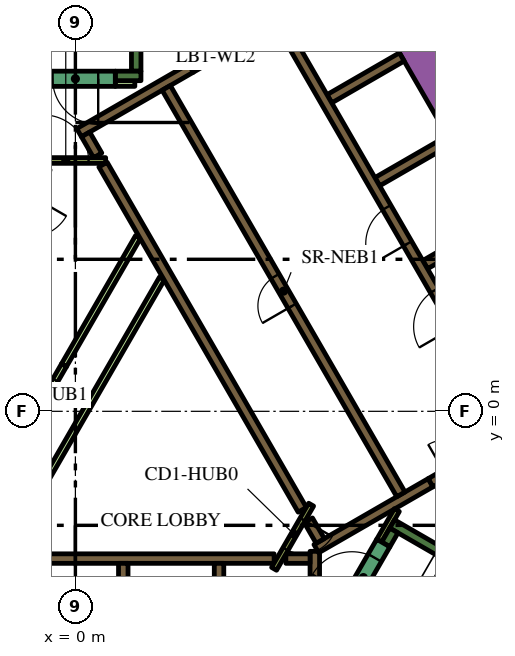
"""IFC4 building model, lengths in metres.
Left out: names, types, materials, properties, quantities, classifications, styles, units other than length and angle.
Written with IfcOpenShell. Run it as: python <this file> out.ifc"""

import sys

from ifc_helpers import new_model, si_unit, direction, frame, frame_2d, origin, place, context, subcontext, project, spatial, rectangle, extrude, element, fill, save


model = new_model("IFC4")
c1 = context("Model", 3, precision=1e-05, world=origin(), true_north=direction((0.0, 1.0)))
c2 = subcontext(c1, "Body", "Model", "MODEL_VIEW")
j1 = project(units=[si_unit("LENGTHUNIT", "METRE"), si_unit("PLANEANGLEUNIT", "RADIAN")], contexts=[c1])
p1 = place(None, origin())
s1 = spatial("IfcSite", under=j1, at=p1, CompositionType="ELEMENT")
p2 = place(p1, origin())
s2 = spatial("IfcBuilding", under=s1, at=p2, CompositionType="ELEMENT")
p3 = place(p2, frame((0.0, 0.0, 66.6)))
s3 = spatial("IfcBuildingStorey", under=s2, at=p3, CompositionType="ELEMENT", Elevation=66.6)
p4 = place(p3, frame((6.461, 13.909, 0.0), z_axis=(0.0, 0.0, 1.0), x_axis=(0.500005804227, -0.866022052686, 0.0)))
e1 = element("IfcWall", 1, at=p4, inside=s3, PredefinedType="SOLIDWALL", context=c2, shape_type="SweptSolid", body=[
    extrude(rectangle(XDim=20.834, YDim=0.9, at=frame_2d((10.417, 0.0))), origin(), (0.0, 0.0, 1.0), 3.9),
])
p5 = place(p3, frame((8.334, -2.964, 0.0), z_axis=(0.0, 0.0, 1.0), x_axis=(0.866016039709, -0.500016218704, 0.0)))
e2 = element("IfcWall", 2, at=p5, inside=s3, PredefinedType="SOLIDWALL", context=c2, shape_type="SweptSolid", body=[
    extrude(rectangle(XDim=7.05, YDim=0.25, at=frame_2d((3.525, 0.0))), origin(), (0.0, 0.0, 1.0), 3.9),
])
p6 = place(p3, frame((8.168, -3.503, 0.0), z_axis=(0.0, 0.0, 1.0), x_axis=(0.49972245349, 0.866185586049, 0.0)))
e3 = element("IfcWall", 3, at=p6, inside=s3, PredefinedType="SOLIDWALL", context=c2, shape_type="SweptSolid", body=[
    extrude(rectangle(XDim=0.425, YDim=0.25, at=frame_2d((0.212, 0.0))), origin(), (0.0, 0.0, 1.0), 3.9),
])
p7 = place(p3, frame((1.6, 8.95, 0.0), z_axis=(0.0, 0.0, 1.0), x_axis=(0.0, 1.0, 0.0)))
e4 = element("IfcWall", 4, at=p7, inside=s3, PredefinedType="SOLIDWALL", context=c2, shape_type="SweptSolid", body=[
    extrude(rectangle(XDim=6.8, YDim=0.25, at=frame_2d((3.4, 0.0))), origin(), (0.0, 0.0, 1.0), 3.9),
])
p8 = place(p3, frame((1.05, 8.825, 0.0), z_axis=(0.0, 0.0, 1.0), x_axis=(1.0, 0.0, 0.0)))
e5 = element("IfcWall", 5, at=p8, inside=s3, PredefinedType="SOLIDWALL", context=c2, shape_type="SweptSolid", body=[
    extrude(rectangle(XDim=0.675, YDim=0.25, at=frame_2d((0.337, 0.0))), origin(), (0.0, 0.0, 1.0), 3.9),
])
p9 = place(p3, frame((-5.259, -3.875, 0.0), z_axis=(0.0, 0.0, 1.0), x_axis=(1.0, 0.0, 0.0)))
e6 = element("IfcWall", 6, at=p9, inside=s3, PredefinedType="SOLIDWALL", context=c2, shape_type="SweptSolid", body=[
    extrude(rectangle(XDim=10.489, YDim=0.25, at=frame_2d((5.244, 0.0))), origin(), (0.0, 0.0, 1.0), 3.9),
])
for number, where, z_axis, x_axis in (
    (7, (3.78, -4.0, 0.0), (0.0, 0.0, 1.0), (0.0, -1.0, 0.0)),
    (8, (1.26, -4.0, 0.0), (0.0, 0.0, 1.0), (0.0, -1.0, 0.0)),
):
    element("IfcWall", number, at=place(p3, frame(where, z_axis=z_axis, x_axis=x_axis)), inside=s3, PredefinedType="SOLIDWALL", context=c2, shape_type="SweptSolid", body=[
        extrude(rectangle(XDim=2.2, YDim=0.25, at=frame_2d((1.1, 0.0))), origin(), (0.0, 0.0, 1.0), 3.9),
    ])
p10 = place(p3, frame((6.3, -7.27, 0.0), z_axis=(0.0, 0.0, 1.0), x_axis=(0.0, 1.0, 0.0)))
e9 = element("IfcWall", 9, at=p10, inside=s3, PredefinedType="SOLIDWALL", context=c2, shape_type="SweptSolid", body=[
    extrude(rectangle(XDim=3.586, YDim=0.25, at=frame_2d((1.793, 0.0))), origin(), (0.0, 0.0, 1.0), 3.9),
])
p11 = place(p3, frame((5.538, -3.875, 0.0), z_axis=(0.0, 0.0, 1.0), x_axis=(1.0, 0.0, 0.0)))
e10 = element("IfcWall", 10, at=p11, inside=s3, PredefinedType="SOLIDWALL", context=c2, shape_type="SweptSolid", body=[
    extrude(rectangle(XDim=0.637, YDim=0.25, at=frame_2d((0.318, 0.0))), origin(), (0.0, 0.0, 1.0), 3.9),
])
p12 = place(p3, frame((9.346, -1.879, 0.0), z_axis=(0.0, 0.0, 1.0), x_axis=(-0.866048528039, -0.499959945477, 0.0)))
e11 = element("IfcWall", 11, at=p12, inside=s3, PredefinedType="SOLIDWALL", context=c2, shape_type="SweptSolid", body=[
    extrude(rectangle(XDim=3.47, YDim=0.25, at=frame_2d((1.735, 0.0))), origin(), (0.0, 0.0, 1.0), 3.9),
])
p13 = place(p3, frame((6.13, -2.867, 0.0), z_axis=(0.0, 0.0, 1.0), x_axis=(0.500160776593, -0.865932559475, 0.0)))
e12 = element("IfcWall", 12, at=p13, inside=s3, PredefinedType="SOLIDWALL", context=c2, shape_type="SweptSolid", body=[
    extrude(rectangle(XDim=0.627, YDim=0.25, at=frame_2d((0.313, 0.0))), origin(), (0.0, 0.0, 1.0), 3.9),
])
for number, where, z_axis, x_axis in (
    (13, (9.204, 3.859, 0.0), (0.0, 0.0, 1.0), (0.866, 0.5, 0.0)),
    (14, (7.944, 6.041, 0.0), (0.0, 0.0, 1.0), (0.866, 0.5, 0.0)),
    (15, (6.684, 8.224, 0.0), (0.0, 0.0, 1.0), (0.866, 0.5, 0.0)),
):
    element("IfcWall", number, at=place(p3, frame(where, z_axis=z_axis, x_axis=x_axis)), inside=s3, PredefinedType="SOLIDWALL", context=c2, shape_type="SweptSolid", body=[
        extrude(rectangle(XDim=2.2, YDim=0.25, at=frame_2d((1.1, 0.0))), origin(), (0.0, 0.0, 1.0), 3.9),
    ])
p14 = place(p3, frame((0.098, 7.331, 0.0), z_axis=(0.0, 0.0, 1.0), x_axis=(0.865988154826, 0.50006451154, 0.0)))
e16 = element("IfcWall", 16, at=p14, inside=s3, PredefinedType="SOLIDWALL", context=c2, shape_type="SweptSolid", body=[
    extrude(rectangle(XDim=3.398, YDim=0.25, at=frame_2d((1.699, 0.0))), origin(), (0.0, 0.0, 1.0), 3.9),
])
p15 = place(p3, frame((0.268, 7.285, 0.0), z_axis=(0.0, 0.0, 1.0), x_axis=(0.500098681536, -0.865968422476, 0.0)))
e17 = element("IfcWall", 17, at=p15, inside=s3, PredefinedType="SOLIDWALL", context=c2, shape_type="SweptSolid", body=[
    extrude(rectangle(XDim=0.636, YDim=0.25, at=frame_2d((0.318, 0.0))), origin(), (0.0, 0.0, 1.0), 3.9),
])
p16 = place(p3, frame((5.97, -2.591, 0.0), z_axis=(0.0, 0.0, 1.0), x_axis=(-0.499994469932, 0.866028596547, 0.0)))
e18 = element("IfcWall", 18, at=p16, inside=s3, PredefinedType="SOLIDWALL", context=c2, shape_type="SweptSolid", body=[
    extrude(rectangle(XDim=10.488, YDim=0.25, at=frame_2d((5.244, 0.0))), origin(), (0.0, 0.0, 1.0), 3.9),
])
p17 = place(p3, frame((8.459, -2.599, 0.0), z_axis=(0.0, 0.0, 1.0), x_axis=(-0.500041054325, -0.866001699761, 0.0)))
e19 = element("IfcWall", 19, at=p17, inside=s3, PredefinedType="PARTITIONING", context=c2, shape_type="SweptSolid", body=[
    extrude(rectangle(XDim=0.929, YDim=0.15, at=frame_2d((0.464, 0.0))), origin(), (0.0, 0.0, 1.0), 3.9),
])
p18 = place(p3, frame((-1.887, -3.718, 0.0), z_axis=(0.0, 0.0, 1.0), x_axis=(0.500005008002, 0.866022512394, 0.0)))
e20 = element("IfcWall", 20, at=p18, inside=s3, PredefinedType="PARTITIONING", context=c2, shape_type="SweptSolid", body=[
    extrude(rectangle(XDim=8.327, YDim=0.15, at=frame_2d((4.164, 0.0))), origin(), (0.0, 0.0, 1.0), 2.75),
])
p19 = place(p3, frame((-0.3, 1.212, 0.0), z_axis=(0.0, 0.0, 1.0), x_axis=(0.499963101113, 0.866046706318, 0.0)))
e21 = element("IfcWall", 21, at=p19, inside=s3, PredefinedType="PARTITIONING", context=c2, shape_type="SweptSolid", body=[
    extrude(rectangle(XDim=3.893, YDim=0.15, at=frame_2d((1.947, 0.0))), origin(), (0.0, 0.0, 1.0), 2.75),
])
p20 = place(p3, frame((1.05, 8.625, 0.0), z_axis=(0.0, 0.0, 1.0), x_axis=(1.0, 0.0, 0.0)))
e22 = element("IfcWall", 22, at=p20, inside=s3, PredefinedType="PARTITIONING", context=c2, shape_type="SweptSolid", body=[
    extrude(rectangle(XDim=0.514, YDim=0.15, at=frame_2d((0.257, 0.0))), origin(), (0.0, 0.0, 1.0), 2.75),
])
p21 = place(p3, frame((11.553, -0.46, 0.0), z_axis=(0.0, 0.0, 1.0), x_axis=(-0.500006514828, 0.866021642414, 0.0)))
e23 = element("IfcWall", 23, at=p21, inside=s3, PredefinedType="SOLIDWALL", context=c2, shape_type="SweptSolid", body=[
    extrude(rectangle(XDim=12.35, YDim=0.25, at=frame_2d((6.175, 0.0))), origin(), (0.0, 0.0, 1.0), 3.9),
])
p22 = place(p21, frame((0.585, 0.0, 0.0)))
e24 = element("IfcOpeningElement", 24, at=p22, cuts=e23, PredefinedType="OPENING", context=c2, shape_type="SweptSolid", body=[
    extrude(rectangle(XDim=1.1, YDim=2.1, at=frame_2d((0.55, 1.05))), frame((0.0, 0.135, 0.0), z_axis=(0.0, -1.0, 0.0), x_axis=(1.0, 0.0, 0.0)), (0.0, 0.0, 1.0), 0.27),
])
p23 = place(p21, frame((3.105, 0.0, 0.0)))
e25 = element("IfcOpeningElement", 25, at=p23, cuts=e23, PredefinedType="OPENING", context=c2, shape_type="SweptSolid", body=[
    extrude(rectangle(XDim=1.1, YDim=2.1, at=frame_2d((0.55, 1.05))), frame((0.0, 0.135, 0.0), z_axis=(0.0, -1.0, 0.0), x_axis=(1.0, 0.0, 0.0)), (0.0, 0.0, 1.0), 0.27),
])
p24 = place(p21, frame((5.625, 0.0, 0.0)))
e26 = element("IfcOpeningElement", 26, at=p24, cuts=e23, PredefinedType="OPENING", context=c2, shape_type="SweptSolid", body=[
    extrude(rectangle(XDim=1.1, YDim=2.1, at=frame_2d((0.55, 1.05))), frame((0.0, 0.135, 0.0), z_axis=(0.0, -1.0, 0.0), x_axis=(1.0, 0.0, 0.0)), (0.0, 0.0, 1.0), 0.27),
])
p25 = place(p3, frame((8.565, -2.185, 0.0), z_axis=(0.0, 0.0, 1.0), x_axis=(-0.499997954832, 0.866026584559, 0.0)))
e27 = element("IfcWall", 27, at=p25, inside=s3, PredefinedType="SOLIDWALL", context=c2, shape_type="SweptSolid", body=[
    extrude(rectangle(XDim=12.35, YDim=0.25, at=frame_2d((6.175, 0.0))), origin(), (0.0, 0.0, 1.0), 3.9),
])
p26 = place(p25, frame((5.725, 0.0, 0.0)))
e28 = element("IfcOpeningElement", 28, at=p26, cuts=e27, PredefinedType="OPENING", context=c2, shape_type="SweptSolid", body=[
    extrude(rectangle(XDim=0.9, YDim=2.1, at=frame_2d((0.45, 1.05))), frame((0.0, 0.135, 0.0), z_axis=(0.0, -1.0, 0.0), x_axis=(1.0, 0.0, 0.0)), (0.0, 0.0, 1.0), 0.27),
])
p27 = place(p3, frame((7.053, -5.284, 0.0), z_axis=(0.0, 0.0, 1.0), x_axis=(0.500078061341, 0.865980330357, 0.0)))
e29 = element("IfcWall", 29, at=p27, inside=s3, PredefinedType="SOLIDWALL", context=c2, shape_type="SweptSolid", body=[
    extrude(rectangle(XDim=2.1, YDim=0.4, at=frame_2d((1.05, 0.0))), origin(), (0.0, 0.0, 1.0), 3.9),
])
p28 = place(p27, frame((0.45, 0.0, 0.0)))
e30 = element("IfcOpeningElement", 30, at=p28, cuts=e29, PredefinedType="OPENING", context=c2, shape_type="SweptSolid", body=[
    extrude(rectangle(XDim=1.2, YDim=2.1, at=frame_2d((0.6, 1.05))), frame((0.0, 0.21, 0.0), z_axis=(0.0, -1.0, 0.0), x_axis=(1.0, 0.0, 0.0)), (0.0, 0.0, 1.0), 0.42),
])
p29 = place(p3, frame((9.346, -1.879, 0.0), z_axis=(0.0, 0.0, 1.0), x_axis=(0.866047807691, 0.499961193289, 0.0)))
e31 = element("IfcWall", 31, at=p29, inside=s3, PredefinedType="SOLIDWALL", context=c2, shape_type="SweptSolid", body=[
    extrude(rectangle(XDim=1.8, YDim=0.25, at=frame_2d((0.9, 0.0))), origin(), (0.0, 0.0, 1.0), 3.9),
])
p30 = place(p29, frame((0.45, 0.0, 0.0)))
e32 = element("IfcOpeningElement", 32, at=p30, cuts=e31, PredefinedType="OPENING", context=c2, shape_type="SweptSolid", body=[
    extrude(rectangle(XDim=0.9, YDim=2.1, at=frame_2d((0.45, 1.05))), frame((0.0, 0.135, 0.0), z_axis=(0.0, -1.0, 0.0), x_axis=(1.0, 0.0, 0.0)), (0.0, 0.0, 1.0), 0.27),
])
p31 = place(p3, frame((1.05, 8.75, 0.0), z_axis=(0.0, 0.0, 1.0), x_axis=(-1.0, 0.0, 0.0)))
e33 = element("IfcWall", 33, at=p31, inside=s3, PredefinedType="SOLIDWALL", context=c2, shape_type="SweptSolid", body=[
    extrude(rectangle(XDim=2.1, YDim=0.4, at=frame_2d((1.05, 0.0))), origin(), (0.0, 0.0, 1.0), 3.9),
])
p32 = place(p31, frame((0.45, 0.0, 0.0)))
e34 = element("IfcOpeningElement", 34, at=p32, cuts=e33, PredefinedType="OPENING", context=c2, shape_type="SweptSolid", body=[
    extrude(rectangle(XDim=1.2, YDim=2.1, at=frame_2d((0.6, 1.05))), frame((0.0, 0.21, 0.0), z_axis=(0.0, -1.0, 0.0), x_axis=(1.0, 0.0, 0.0)), (0.0, 0.0, 1.0), 0.42),
])
p33 = place(p3, frame((6.203, -2.456, 0.0), z_axis=(0.0, 0.0, 1.0), x_axis=(-0.500043961785, -0.866000020948, 0.0)))
e35 = element("IfcWall", 35, at=p33, inside=s3, PredefinedType="PARTITIONING", context=c2, shape_type="SweptSolid", body=[
    extrude(rectangle(XDim=1.95, YDim=0.15, at=frame_2d((0.975, 0.0))), origin(), (0.0, 0.0, 1.0), 3.9),
])
p34 = place(p33, frame((0.45, 0.0, 0.0)))
e36 = element("IfcOpeningElement", 36, at=p34, cuts=e35, PredefinedType="OPENING", context=c2, shape_type="SweptSolid", body=[
    extrude(rectangle(XDim=0.9, YDim=2.1, at=frame_2d((0.45, 1.05))), frame((0.0, 0.085, 0.0), z_axis=(0.0, -1.0, 0.0), x_axis=(1.0, 0.0, 0.0)), (0.0, 0.0, 1.0), 0.17),
])
p35 = place(p3, frame((-1.303, 6.6, 0.0), z_axis=(0.0, 0.0, 1.0), x_axis=(1.0, 0.0, 0.0)))
e37 = element("IfcWall", 37, at=p35, inside=s3, PredefinedType="PARTITIONING", context=c2, shape_type="SweptSolid", body=[
    extrude(rectangle(XDim=2.1, YDim=0.15, at=frame_2d((1.05, 0.0))), origin(), (0.0, 0.0, 1.0), 3.9),
])
p36 = place(p35, frame((0.45, 0.0, 0.0)))
e38 = element("IfcOpeningElement", 38, at=p36, cuts=e37, PredefinedType="OPENING", context=c2, shape_type="SweptSolid", body=[
    extrude(rectangle(XDim=1.2, YDim=2.1, at=frame_2d((0.6, 1.05))), frame((0.0, 0.085, 0.0), z_axis=(0.0, -1.0, 0.0), x_axis=(1.0, 0.0, 0.0)), (0.0, 0.0, 1.0), 0.17),
])
p37 = place(p3, frame((3.081, 8.961, 0.0), z_axis=(0.0, 0.0, 1.0), x_axis=(0.866034573852, 0.49998411664, 0.0)))
e39 = element("IfcWall", 39, at=p37, inside=s3, PredefinedType="PARTITIONING", context=c2, shape_type="SweptSolid", body=[
    extrude(rectangle(XDim=1.4, YDim=0.09, at=frame_2d((0.7, 0.0))), origin(), (0.0, 0.0, 1.0), 2.75),
])
p38 = place(p37, frame((0.1, 0.0, 0.0)))
e40 = element("IfcOpeningElement", 40, at=p38, cuts=e39, PredefinedType="OPENING", context=c2, shape_type="SweptSolid", body=[
    extrude(rectangle(XDim=1.2, YDim=2.1, at=frame_2d((0.6, 1.05))), frame((0.0, 0.055, 0.0), z_axis=(0.0, -1.0, 0.0), x_axis=(1.0, 0.0, 0.0)), (0.0, 0.0, 1.0), 0.11),
])
p39 = place(p3, frame((-1.2, -0.346, 0.0), z_axis=(0.0, 0.0, 1.0), x_axis=(0.499961193289, 0.866047807691, 0.0)))
e41 = element("IfcWall", 41, at=p39, inside=s3, PredefinedType="PARTITIONING", context=c2, shape_type="SweptSolid", body=[
    extrude(rectangle(XDim=1.8, YDim=0.15, at=frame_2d((0.9, 0.0))), origin(), (0.0, 0.0, 1.0), 2.75),
])
p40 = place(p39, frame((0.45, 0.0, 0.0)))
e42 = element("IfcOpeningElement", 42, at=p40, cuts=e41, PredefinedType="OPENING", context=c2, shape_type="SweptSolid", body=[
    extrude(rectangle(XDim=0.9, YDim=2.1, at=frame_2d((0.45, 1.05))), frame((0.0, 0.085, 0.0), z_axis=(0.0, -1.0, 0.0), x_axis=(1.0, 0.0, 0.0)), (0.0, 0.0, 1.0), 0.17),
])
p41 = place(p3, frame((6.163, 18.475, 0.0), z_axis=(0.0, 0.0, 1.0), x_axis=(0.500001317485, -0.866024643133, 0.0)))
e43 = element("IfcWall", 43, at=p41, inside=s3, PredefinedType="PARTITIONING", context=c2, shape_type="SweptSolid", body=[
    extrude(rectangle(XDim=25.767, YDim=0.15, at=frame_2d((12.883, 0.0))), origin(), (0.0, 0.0, 1.0), 2.75),
])
p42 = place(p41, frame((21.138, 0.0, 0.0)))
e44 = element("IfcOpeningElement", 44, at=p42, cuts=e43, PredefinedType="OPENING", context=c2, shape_type="SweptSolid", body=[
    extrude(rectangle(XDim=1.0, YDim=2.1, at=frame_2d((0.5, 1.05))), frame((0.0, 0.085, 0.0), z_axis=(0.0, -1.0, 0.0), x_axis=(1.0, 0.0, 0.0)), (0.0, 0.0, 1.0), 0.17),
])
p43 = place(p41, frame((9.948, 0.0, 0.0)))
e45 = element("IfcOpeningElement", 45, at=p43, cuts=e43, PredefinedType="OPENING", context=c2, shape_type="SweptSolid", body=[
    extrude(rectangle(XDim=1.1, YDim=2.1, at=frame_2d((0.55, 1.05))), frame((0.0, 0.085, 0.0), z_axis=(0.0, -1.0, 0.0), x_axis=(1.0, 0.0, 0.0)), (0.0, 0.0, 1.0), 0.17),
])
p44 = place(p41, frame((8.641, 0.0, 0.0)))
e46 = element("IfcOpeningElement", 46, at=p44, cuts=e43, PredefinedType="OPENING", context=c2, shape_type="SweptSolid", body=[
    extrude(rectangle(XDim=1.0, YDim=2.1, at=frame_2d((0.5, 1.05))), frame((0.0, 0.085, 0.0), z_axis=(0.0, -1.0, 0.0), x_axis=(1.0, 0.0, 0.0)), (0.0, 0.0, 1.0), 0.17),
])
p45 = place(p41, frame((0.18, 0.0, 0.0)))
e47 = element("IfcOpeningElement", 47, at=p45, cuts=e43, PredefinedType="OPENING", context=c2, shape_type="SweptSolid", body=[
    extrude(rectangle(XDim=1.0, YDim=2.1, at=frame_2d((0.5, 1.05))), frame((0.0, 0.085, 0.0), z_axis=(0.0, -1.0, 0.0), x_axis=(1.0, 0.0, 0.0)), (0.0, 0.0, 1.0), 0.17),
])
p46 = place(p23, origin())
e48 = element("IfcDoor", 48, at=p46, inside=s3, OperationType="DOUBLE_DOOR_SLIDING", PredefinedType="DOOR", context=c2, shape_type="SweptSolid", body=[
    extrude(rectangle(XDim=1.1, YDim=2.1, at=frame_2d((0.55, 1.05))), frame((0.0, 0.025, 0.0), z_axis=(0.0, -1.0, 0.0), x_axis=(1.0, 0.0, 0.0)), (0.0, 0.0, 1.0), 0.05),
])
fill(e25, e48)
p47 = place(p24, origin())
e49 = element("IfcDoor", 49, at=p47, inside=s3, OperationType="DOUBLE_DOOR_SLIDING", PredefinedType="DOOR", context=c2, shape_type="SweptSolid", body=[
    extrude(rectangle(XDim=1.1, YDim=2.1, at=frame_2d((0.55, 1.05))), frame((0.0, 0.025, 0.0), z_axis=(0.0, -1.0, 0.0), x_axis=(1.0, 0.0, 0.0)), (0.0, 0.0, 1.0), 0.05),
])
fill(e26, e49)
p48 = place(p26, origin())
e50 = element("IfcDoor", 50, at=p48, inside=s3, OperationType="SINGLE_SWING_LEFT", PredefinedType="DOOR", context=c2, shape_type="SweptSolid", body=[
    extrude(rectangle(XDim=0.9, YDim=2.1, at=frame_2d((0.45, 1.05))), frame((0.0, 0.025, 0.0), z_axis=(0.0, -1.0, 0.0), x_axis=(1.0, 0.0, 0.0)), (0.0, 0.0, 1.0), 0.05),
])
fill(e28, e50)
p49 = place(p28, origin())
e51 = element("IfcDoor", 51, at=p49, inside=s3, OperationType="SINGLE_SWING_LEFT", PredefinedType="DOOR", context=c2, shape_type="SweptSolid", body=[
    extrude(rectangle(XDim=1.2, YDim=2.1, at=frame_2d((0.6, 1.05))), frame((0.0, 0.025, 0.0), z_axis=(0.0, -1.0, 0.0), x_axis=(1.0, 0.0, 0.0)), (0.0, 0.0, 1.0), 0.05),
])
fill(e30, e51)
p50 = place(p32, origin())
e52 = element("IfcDoor", 52, at=p50, inside=s3, OperationType="SINGLE_SWING_LEFT", PredefinedType="DOOR", context=c2, shape_type="SweptSolid", body=[
    extrude(rectangle(XDim=1.2, YDim=2.1, at=frame_2d((0.6, 1.05))), frame((0.0, 0.025, 0.0), z_axis=(0.0, -1.0, 0.0), x_axis=(1.0, 0.0, 0.0)), (0.0, 0.0, 1.0), 0.05),
])
fill(e34, e52)
p51 = place(p34, origin())
e53 = element("IfcDoor", 53, at=p51, inside=s3, OperationType="SINGLE_SWING_LEFT", PredefinedType="DOOR", context=c2, shape_type="SweptSolid", body=[
    extrude(rectangle(XDim=0.9, YDim=2.1, at=frame_2d((0.45, 1.05))), frame((0.0, 0.025, 0.0), z_axis=(0.0, -1.0, 0.0), x_axis=(1.0, 0.0, 0.0)), (0.0, 0.0, 1.0), 0.05),
])
fill(e36, e53)
p52 = place(p36, origin())
e54 = element("IfcDoor", 54, at=p52, inside=s3, OperationType="SINGLE_SWING_LEFT", PredefinedType="DOOR", context=c2, shape_type="SweptSolid", body=[
    extrude(rectangle(XDim=1.2, YDim=2.1, at=frame_2d((0.6, 1.05))), frame((0.0, 0.025, 0.0), z_axis=(0.0, -1.0, 0.0), x_axis=(1.0, 0.0, 0.0)), (0.0, 0.0, 1.0), 0.05),
])
fill(e38, e54)
p53 = place(p38, origin())
e55 = element("IfcDoor", 55, at=p53, inside=s3, OperationType="SINGLE_SWING_LEFT", PredefinedType="DOOR", context=c2, shape_type="SweptSolid", body=[
    extrude(rectangle(XDim=1.2, YDim=2.1, at=frame_2d((0.6, 1.05))), frame((0.0, 0.025, 0.0), z_axis=(0.0, -1.0, 0.0), x_axis=(1.0, 0.0, 0.0)), (0.0, 0.0, 1.0), 0.05),
])
fill(e40, e55)
p54 = place(p40, origin())
e56 = element("IfcDoor", 56, at=p54, inside=s3, OperationType="SINGLE_SWING_LEFT", PredefinedType="DOOR", context=c2, shape_type="SweptSolid", body=[
    extrude(rectangle(XDim=0.9, YDim=2.1, at=frame_2d((0.45, 1.05))), frame((0.0, 0.025, 0.0), z_axis=(0.0, -1.0, 0.0), x_axis=(1.0, 0.0, 0.0)), (0.0, 0.0, 1.0), 0.05),
])
fill(e42, e56)
save(model, sys.argv[1])
